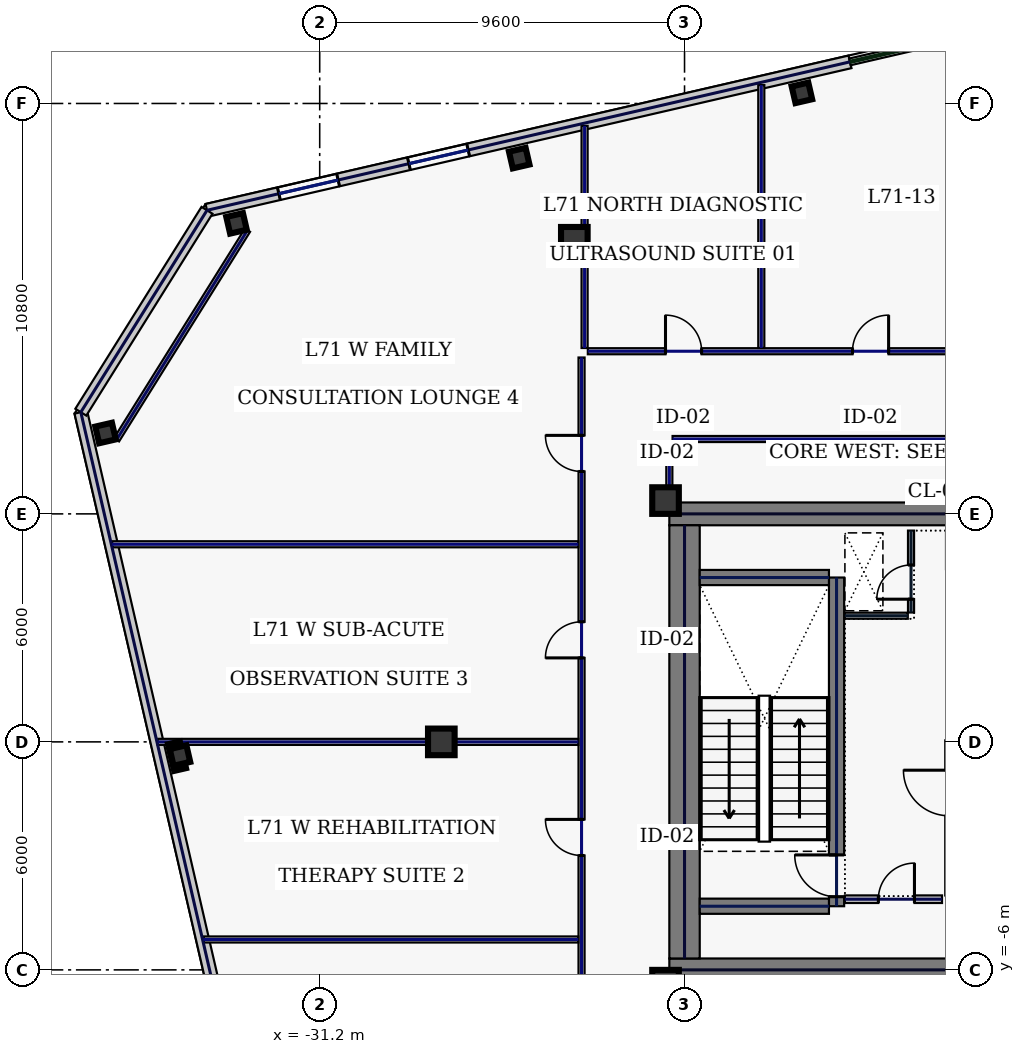
"""IFC4 building model, lengths in metres.
Left out: names, types, materials, properties, quantities, classifications, styles, units other than length and angle.
Written with IfcOpenShell. Run it as: python <this file> out.ifc"""

import sys

from ifc_helpers import new_model, si_unit, direction, frame, frame_2d, origin, origin_2d, place, context, subcontext, project, spatial, rectangle, hollow_rectangle, extrude, element, fill, save


model = new_model("IFC4")
c1 = context("Model", 3, precision=1e-05, world=origin(), true_north=direction((0.0, 1.0)))
c2 = subcontext(c1, "Body", "Model", "MODEL_VIEW")
j1 = project(units=[si_unit("LENGTHUNIT", "METRE"), si_unit("PLANEANGLEUNIT", "RADIAN")], contexts=[c1])
p1 = place(None, origin())
s1 = spatial("IfcSite", under=j1, at=p1, CompositionType="ELEMENT")
p2 = place(p1, origin())
s2 = spatial("IfcBuilding", under=s1, at=p2, CompositionType="ELEMENT")
p3 = place(p2, frame((0.0, 0.0, 305.0)))
s3 = spatial("IfcBuildingStorey", under=s2, at=p3, CompositionType="ELEMENT", Elevation=305.0)
for number, where, z_axis, x_axis in (
    (1, (-22.0, 6.0, 0.0), (0.0, 0.0, 1.0), (1.0, 0.0, 0.0)),
    (2, (-22.0, -6.0, 0.0), (0.0, 0.0, 1.0), (1.0, 0.0, 0.0)),
):
    element("IfcWall", number, at=place(p3, frame(where, z_axis=z_axis, x_axis=x_axis)), inside=s3, PredefinedType="SHEAR", context=c2, shape_type="SweptSolid", body=[
        extrude(rectangle(XDim=11.5, YDim=0.6, at=frame_2d((5.75, 0.0))), origin(), (0.0, 0.0, 1.0), 3.74),
    ])
p4 = place(p3, frame((-21.6, -5.7, 0.0), z_axis=(0.0, 0.0, 1.0), x_axis=(0.0, 1.0, 0.0)))
e3 = element("IfcWall", 3, at=p4, inside=s3, PredefinedType="SHEAR", context=c2, shape_type="SweptSolid", body=[
    extrude(rectangle(XDim=11.4, YDim=0.8, at=frame_2d((5.7, 0.0))), origin(), (0.0, 0.0, 1.0), 3.74),
])
p5 = place(p3, frame((-17.6, -4.325, 0.0), z_axis=(0.0, 0.0, 1.0), x_axis=(0.0, 1.0, 0.0)))
e4 = element("IfcWall", 4, at=p5, inside=s3, PredefinedType="SHEAR", context=c2, shape_type="SweptSolid", body=[
    extrude(rectangle(XDim=8.65, YDim=0.4, at=frame_2d((4.325, 0.0))), origin(), (0.0, 0.0, 1.0), 3.74),
])
p6 = place(p5, frame((0.25, 0.0, 0.0)))
e5 = element("IfcOpeningElement", 5, at=p6, cuts=e4, PredefinedType="OPENING", context=c2, shape_type="SweptSolid", body=[
    extrude(rectangle(XDim=1.1, YDim=2.2, at=frame_2d((0.55, 1.1))), frame((0.0, 0.21, 0.0), z_axis=(0.0, -1.0, 0.0), x_axis=(1.0, 0.0, 0.0)), (0.0, 0.0, 1.0), 0.42),
])
for number, where, z_axis, x_axis in (
    (6, (-21.2, -4.325, 0.0), (0.0, 0.0, 1.0), (1.0, 0.0, 0.0)),
    (7, (-21.2, 4.325, 0.0), (0.0, 0.0, 1.0), (1.0, 0.0, 0.0)),
):
    element("IfcWall", number, at=place(p3, frame(where, z_axis=z_axis, x_axis=x_axis)), inside=s3, PredefinedType="SHEAR", context=c2, shape_type="SweptSolid", body=[
        extrude(rectangle(XDim=3.4, YDim=0.4, at=frame_2d((1.7, 0.0))), origin(), (0.0, 0.0, 1.0), 3.74),
    ])
for number, where, z_axis, x_axis in (
    (8, (-22.1, -6.35, 0.0), (0.0, 0.0, 1.0), (1.0, 0.0, 0.0)),
    (9, (-22.1, 6.35, 0.0), (0.0, 0.0, 1.0), (1.0, 0.0, 0.0)),
    (10, (-24.5, 13.2, 0.0), (0.0, 0.0, 1.0), (1.0, 0.0, 0.0)),
    (11, (-28.0, 0.0, 0.0), (0.0, 0.0, 1.0), (1.0, 0.0, 0.0)),
):
    element("IfcColumn", number, at=place(p3, frame(where, z_axis=z_axis, x_axis=x_axis)), inside=s3, PredefinedType="COLUMN", context=c2, shape_type="SweptSolid", body=[
        extrude(hollow_rectangle(XDim=0.7, YDim=0.7, WallThickness=0.032, at=origin_2d()), origin(), (0.0, 0.0, 1.0), 3.74),
    ])
for number, where, z_axis, x_axis in (
    (12, (-18.511, 17.08, 0.0), (0.0, 0.0, 1.0), (0.974, 0.225, 0.0)),
    (13, (-25.95, 15.362, 0.0), (0.0, 0.0, 1.0), (0.974, 0.225, 0.0)),
    (14, (-33.389, 13.645, 0.0), (0.0, 0.0, 1.0), (0.974, 0.225, 0.0)),
    (15, (-36.836, 8.128, 0.0), (0.0, 0.0, 1.0), (0.974, 0.225, 0.0)),
    (16, (-34.877, -0.359, 0.0), (0.0, 0.0, 1.0), (0.974, 0.225, 0.0)),
):
    element("IfcColumn", number, at=place(p3, frame(where, z_axis=z_axis, x_axis=x_axis)), inside=s3, PredefinedType="COLUMN", context=c2, shape_type="SweptSolid", body=[
        extrude(hollow_rectangle(XDim=0.45, YDim=0.45, WallThickness=0.022, at=origin_2d()), origin(), (0.0, 0.0, 1.0), 3.74),
    ])
p7 = place(p3, frame((-17.245, 17.895, 0.0), z_axis=(0.0, 0.0, 1.0), x_axis=(-0.97437318493, -0.224937539085, 0.0)))
e17 = element("IfcWall", 17, at=p7, inside=s3, PredefinedType="STANDARD", context=c2, shape_type="SweptSolid", body=[
    extrude(rectangle(XDim=17.366, YDim=0.34, at=frame_2d((8.683, 0.0))), origin(), (0.0, 0.0, 1.0), 3.74),
])
p8 = place(p7, frame((13.825, 0.0, 0.22)))
e18 = element("IfcOpeningElement", 18, at=p8, cuts=e17, PredefinedType="OPENING", context=c2, shape_type="SweptSolid", body=[
    extrude(rectangle(XDim=1.6, YDim=1.2, at=frame_2d((0.8, 0.6))), frame((0.0, 0.18, 0.0), z_axis=(0.0, -1.0, 0.0), x_axis=(1.0, 0.0, 0.0)), (0.0, 0.0, 1.0), 0.36),
])
p9 = place(p7, frame((10.313, 0.0, 0.22)))
e19 = element("IfcOpeningElement", 19, at=p9, cuts=e17, PredefinedType="OPENING", context=c2, shape_type="SweptSolid", body=[
    extrude(rectangle(XDim=1.6, YDim=1.2, at=frame_2d((0.8, 0.6))), frame((0.0, 0.18, 0.0), z_axis=(0.0, -1.0, 0.0), x_axis=(1.0, 0.0, 0.0)), (0.0, 0.0, 1.0), 0.36),
])
p10 = place(p3, frame((-37.486, 8.676, 0.0), z_axis=(0.0, 0.0, 1.0), x_axis=(0.224953091034, -0.974369594576, 0.0)))
e20 = element("IfcWall", 20, at=p10, inside=s3, PredefinedType="STANDARD", context=c2, shape_type="SweptSolid", body=[
    extrude(rectangle(XDim=36.2, YDim=0.34, at=frame_2d((18.1, 0.0))), origin(), (0.0, 0.0, 1.0), 3.74),
])
p11 = place(p10, frame((21.825, 0.0, 0.22)))
e21 = element("IfcOpeningElement", 21, at=p11, cuts=e20, PredefinedType="OPENING", context=c2, shape_type="SweptSolid", body=[
    extrude(rectangle(XDim=1.6, YDim=1.2, at=frame_2d((0.8, 0.6))), frame((0.0, 0.18, 0.0), z_axis=(0.0, -1.0, 0.0), x_axis=(1.0, 0.0, 0.0)), (0.0, 0.0, 1.0), 0.36),
])
p12 = place(p10, frame((30.875, 0.0, 0.22)))
e22 = element("IfcOpeningElement", 22, at=p12, cuts=e20, PredefinedType="OPENING", context=c2, shape_type="SweptSolid", body=[
    extrude(rectangle(XDim=1.6, YDim=1.2, at=frame_2d((0.8, 0.6))), frame((0.0, 0.18, 0.0), z_axis=(0.0, -1.0, 0.0), x_axis=(1.0, 0.0, 0.0)), (0.0, 0.0, 1.0), 0.36),
])
p13 = place(p3, frame((-34.166, 13.989, 0.0), z_axis=(0.0, 0.0, 1.0), x_axis=(-0.529935887993, -0.848037708252, 0.0)))
e23 = element("IfcWall", 23, at=p13, inside=s3, PredefinedType="STANDARD", context=c2, shape_type="SweptSolid", body=[
    extrude(rectangle(XDim=6.265, YDim=0.34, at=frame_2d((3.133, 0.0))), origin(), (0.0, 0.0, 1.0), 3.74),
])
p14 = place(p3, frame((-15.64, 3.405, 0.0), z_axis=(0.0, 0.0, 1.0), x_axis=(0.0, 1.0, 0.0)))
e24 = element("IfcWall", 24, at=p14, inside=s3, PredefinedType="PARTITIONING", context=c2, shape_type="SweptSolid", body=[
    extrude(rectangle(XDim=2.155, YDim=0.16, at=frame_2d((1.078, 0.0))), origin(), (0.0, 0.0, 1.0), 3.74),
])
p15 = place(p14, frame((0.35, 0.0, 0.0)))
e25 = element("IfcOpeningElement", 25, at=p15, cuts=e24, PredefinedType="OPENING", context=c2, shape_type="SweptSolid", body=[
    extrude(rectangle(XDim=0.9, YDim=2.2, at=frame_2d((0.45, 1.1))), frame((0.0, 0.09, 0.0), z_axis=(0.0, -1.0, 0.0), x_axis=(1.0, 0.0, 0.0)), (0.0, 0.0, 1.0), 0.18),
])
p16 = place(p3, frame((-17.38, 3.32, 0.0), z_axis=(0.0, 0.0, 1.0), x_axis=(1.0, 0.0, 0.0)))
e26 = element("IfcWall", 26, at=p16, inside=s3, PredefinedType="PARTITIONING", context=c2, shape_type="SweptSolid", body=[
    extrude(rectangle(XDim=1.655, YDim=0.16, at=frame_2d((0.827, 0.0))), origin(), (0.0, 0.0, 1.0), 3.74),
])
p17 = place(p3, frame((-17.38, -4.14, 0.0), z_axis=(0.0, 0.0, 1.0), x_axis=(1.0, 0.0, 0.0)))
e27 = element("IfcWall", 27, at=p17, inside=s3, PredefinedType="SOLIDWALL", context=c2, shape_type="SweptSolid", body=[
    extrude(rectangle(XDim=2.555, YDim=0.2, at=frame_2d((1.277, 0.0))), origin(), (0.0, 0.0, 1.0), 3.74),
])
p18 = place(p17, frame((0.88, 0.0, 0.0)))
e28 = element("IfcOpeningElement", 28, at=p18, cuts=e27, PredefinedType="OPENING", context=c2, shape_type="SweptSolid", body=[
    extrude(rectangle(XDim=0.95, YDim=2.2, at=frame_2d((0.475, 1.1))), frame((0.0, 0.11, 0.0), z_axis=(0.0, -1.0, 0.0), x_axis=(1.0, 0.0, 0.0)), (0.0, 0.0, 1.0), 0.22),
])
p19 = place(p3, frame((-14.64, -4.035, 0.0), z_axis=(0.0, 0.0, 1.0), x_axis=(0.0, 1.0, 0.0)))
e29 = element("IfcWall", 29, at=p19, inside=s3, PredefinedType="SOLIDWALL", context=c2, shape_type="SweptSolid", body=[
    extrude(rectangle(XDim=4.075, YDim=0.2, at=frame_2d((2.038, 0.0))), origin(), (0.0, 0.0, 1.0), 3.74),
])
p20 = place(p19, frame((2.09, 0.0, 0.0)))
e30 = element("IfcOpeningElement", 30, at=p20, cuts=e29, PredefinedType="OPENING", context=c2, shape_type="SweptSolid", body=[
    extrude(rectangle(XDim=1.2, YDim=2.2, at=frame_2d((0.6, 1.1))), frame((0.0, 0.11, 0.0), z_axis=(0.0, -1.0, 0.0), x_axis=(1.0, 0.0, 0.0)), (0.0, 0.0, 1.0), 0.22),
])
p21 = place(p3, frame((-33.1, 13.465, 0.0), z_axis=(0.0, 0.0, 1.0), x_axis=(-0.529958457806, -0.848023604035, 0.0)))
e31 = element("IfcWall", 31, at=p21, inside=s3, PredefinedType="PARTITIONING", context=c2, shape_type="SweptSolid", body=[
    extrude(rectangle(XDim=6.505, YDim=0.16, at=frame_2d((3.252, 0.0))), origin(), (0.0, 0.0, 1.0), 1.535),
])
p22 = place(p3, frame((-24.31, -10.015, 0.0), z_axis=(0.0, 0.0, 1.0), x_axis=(0.0, 1.0, 0.0)))
e32 = element("IfcWall", 32, at=p22, inside=s3, PredefinedType="PARTITIONING", context=c2, shape_type="SweptSolid", body=[
    extrude(rectangle(XDim=20.13, YDim=0.16, at=frame_2d((10.065, 0.0))), origin(), (0.0, 0.0, 1.0), 3.74),
])
p23 = place(p22, frame((2.169, 0.0, 0.0)))
e33 = element("IfcOpeningElement", 33, at=p23, cuts=e32, PredefinedType="OPENING", context=c2, shape_type="SweptSolid", body=[
    extrude(rectangle(XDim=0.95, YDim=2.2, at=frame_2d((0.475, 1.1))), frame((0.0, 0.09, 0.0), z_axis=(0.0, -1.0, 0.0), x_axis=(1.0, 0.0, 0.0)), (0.0, 0.0, 1.0), 0.18),
])
p24 = place(p22, frame((7.025, 0.0, 0.0)))
e34 = element("IfcOpeningElement", 34, at=p24, cuts=e32, PredefinedType="OPENING", context=c2, shape_type="SweptSolid", body=[
    extrude(rectangle(XDim=0.95, YDim=2.2, at=frame_2d((0.475, 1.1))), frame((0.0, 0.09, 0.0), z_axis=(0.0, -1.0, 0.0), x_axis=(1.0, 0.0, 0.0)), (0.0, 0.0, 1.0), 0.18),
])
p25 = place(p22, frame((12.225, 0.0, 0.0)))
e35 = element("IfcOpeningElement", 35, at=p25, cuts=e32, PredefinedType="OPENING", context=c2, shape_type="SweptSolid", body=[
    extrude(rectangle(XDim=0.95, YDim=2.2, at=frame_2d((0.475, 1.1))), frame((0.0, 0.09, 0.0), z_axis=(0.0, -1.0, 0.0), x_axis=(1.0, 0.0, 0.0)), (0.0, 0.0, 1.0), 0.18),
])
p26 = place(p22, frame((17.131, 0.0, 0.0)))
e36 = element("IfcOpeningElement", 36, at=p26, cuts=e32, PredefinedType="OPENING", context=c2, shape_type="SweptSolid", body=[
    extrude(rectangle(XDim=0.95, YDim=2.2, at=frame_2d((0.475, 1.1))), frame((0.0, 0.09, 0.0), z_axis=(0.0, -1.0, 0.0), x_axis=(1.0, 0.0, 0.0)), (0.0, 0.0, 1.0), 0.18),
])
p27 = place(p3, frame((-24.145, 10.28, 0.0), z_axis=(0.0, 0.0, 1.0), x_axis=(1.0, 0.0, 0.0)))
e37 = element("IfcWall", 37, at=p27, inside=s3, PredefinedType="PARTITIONING", context=c2, shape_type="SweptSolid", body=[
    extrude(rectangle(XDim=48.29, YDim=0.16, at=frame_2d((24.145, 0.0))), origin(), (0.0, 0.0, 1.0), 3.74),
])
p28 = place(p27, frame((2.044, 0.0, 0.0)))
e38 = element("IfcOpeningElement", 38, at=p28, cuts=e37, PredefinedType="OPENING", context=c2, shape_type="SweptSolid", body=[
    extrude(rectangle(XDim=0.95, YDim=2.2, at=frame_2d((0.475, 1.1))), frame((0.0, 0.09, 0.0), z_axis=(0.0, -1.0, 0.0), x_axis=(1.0, 0.0, 0.0)), (0.0, 0.0, 1.0), 0.18),
])
p29 = place(p27, frame((6.965, 0.0, 0.0)))
e39 = element("IfcOpeningElement", 39, at=p29, cuts=e37, PredefinedType="OPENING", context=c2, shape_type="SweptSolid", body=[
    extrude(rectangle(XDim=0.95, YDim=2.2, at=frame_2d((0.475, 1.1))), frame((0.0, 0.09, 0.0), z_axis=(0.0, -1.0, 0.0), x_axis=(1.0, 0.0, 0.0)), (0.0, 0.0, 1.0), 0.18),
])
p30 = place(p27, frame((13.58, 0.0, 0.0)))
e40 = element("IfcOpeningElement", 40, at=p30, cuts=e37, PredefinedType="OPENING", context=c2, shape_type="SweptSolid", body=[
    extrude(rectangle(XDim=1.45, YDim=2.2, at=frame_2d((0.725, 1.1))), frame((0.0, 0.09, 0.0), z_axis=(0.0, -1.0, 0.0), x_axis=(1.0, 0.0, 0.0)), (0.0, 0.0, 1.0), 0.18),
])
p31 = place(p27, frame((22.205, 0.0, 0.0)))
e41 = element("IfcOpeningElement", 41, at=p31, cuts=e37, PredefinedType="OPENING", context=c2, shape_type="SweptSolid", body=[
    extrude(rectangle(XDim=1.05, YDim=2.2, at=frame_2d((0.525, 1.1))), frame((0.0, 0.09, 0.0), z_axis=(0.0, -1.0, 0.0), x_axis=(1.0, 0.0, 0.0)), (0.0, 0.0, 1.0), 0.18),
])
p32 = place(p27, frame((31.105, 0.0, 0.0)))
e42 = element("IfcOpeningElement", 42, at=p32, cuts=e37, PredefinedType="OPENING", context=c2, shape_type="SweptSolid", body=[
    extrude(rectangle(XDim=0.95, YDim=2.2, at=frame_2d((0.475, 1.1))), frame((0.0, 0.09, 0.0), z_axis=(0.0, -1.0, 0.0), x_axis=(1.0, 0.0, 0.0)), (0.0, 0.0, 1.0), 0.18),
])
p33 = place(p27, frame((39.27, 0.0, 0.0)))
e43 = element("IfcOpeningElement", 43, at=p33, cuts=e37, PredefinedType="OPENING", context=c2, shape_type="SweptSolid", body=[
    extrude(rectangle(XDim=1.3, YDim=2.2, at=frame_2d((0.65, 1.1))), frame((0.0, 0.09, 0.0), z_axis=(0.0, -1.0, 0.0), x_axis=(1.0, 0.0, 0.0)), (0.0, 0.0, 1.0), 0.18),
])
p34 = place(p27, frame((45.291, 0.0, 0.0)))
e44 = element("IfcOpeningElement", 44, at=p34, cuts=e37, PredefinedType="OPENING", context=c2, shape_type="SweptSolid", body=[
    extrude(rectangle(XDim=1.3, YDim=2.2, at=frame_2d((0.65, 1.1))), frame((0.0, 0.09, 0.0), z_axis=(0.0, -1.0, 0.0), x_axis=(1.0, 0.0, 0.0)), (0.0, 0.0, 1.0), 0.18),
])
p35 = place(p3, frame((-10.715, 7.97, 0.0), z_axis=(0.0, 0.0, 1.0), x_axis=(-1.0, 0.0, 0.0)))
e45 = element("IfcWall", 45, at=p35, inside=s3, PredefinedType="PARTITIONING", context=c2, shape_type="SweptSolid", body=[
    extrude(rectangle(XDim=11.2, YDim=0.16, at=frame_2d((5.6, 0.0))), origin(), (0.0, 0.0, 1.0), 3.74),
])
p36 = place(p3, frame((-22.0, 7.885, 0.0), z_axis=(0.0, 0.0, 1.0), x_axis=(0.0, -1.0, 0.0)))
e46 = element("IfcWall", 46, at=p36, inside=s3, PredefinedType="PARTITIONING", context=c2, shape_type="SweptSolid", body=[
    extrude(rectangle(XDim=1.465, YDim=0.16, at=frame_2d((0.732, 0.0))), origin(), (0.0, 0.0, 1.0), 3.74),
])
p37 = place(p3, frame((-24.23, 10.365, 0.0), z_axis=(0.0, 0.0, 1.0), x_axis=(0.0, 1.0, 0.0)))
e47 = element("IfcWall", 47, at=p37, inside=s3, PredefinedType="PARTITIONING", context=c2, shape_type="SweptSolid", body=[
    extrude(rectangle(XDim=5.846, YDim=0.16, at=frame_2d((2.923, 0.0))), origin(), (0.0, 0.0, 1.0), 3.74),
])
p38 = place(p3, frame((-19.58, 10.365, 0.0), z_axis=(0.0, 0.0, 1.0), x_axis=(0.0, 1.0, 0.0)))
e48 = element("IfcWall", 48, at=p38, inside=s3, PredefinedType="PARTITIONING", context=c2, shape_type="SweptSolid", body=[
    extrude(rectangle(XDim=6.919, YDim=0.16, at=frame_2d((3.46, 0.0))), origin(), (0.0, 0.0, 1.0), 3.74),
])
p39 = place(p3, frame((-34.262, -5.2, 0.0), z_axis=(0.0, 0.0, 1.0), x_axis=(1.0, 0.0, 0.0)))
e49 = element("IfcWall", 49, at=p39, inside=s3, PredefinedType="PARTITIONING", context=c2, shape_type="SweptSolid", body=[
    extrude(rectangle(XDim=9.867, YDim=0.16, at=frame_2d((4.933, 0.0))), origin(), (0.0, 0.0, 1.0), 3.74),
])
p40 = place(p3, frame((-35.462, 0.0, 0.0), z_axis=(0.0, 0.0, 1.0), x_axis=(1.0, 0.0, 0.0)))
e50 = element("IfcWall", 50, at=p40, inside=s3, PredefinedType="PARTITIONING", context=c2, shape_type="SweptSolid", body=[
    extrude(rectangle(XDim=11.067, YDim=0.16, at=frame_2d((5.534, 0.0))), origin(), (0.0, 0.0, 1.0), 3.335),
])
p41 = place(p3, frame((-36.663, 5.2, 0.0), z_axis=(0.0, 0.0, 1.0), x_axis=(1.0, 0.0, 0.0)))
e51 = element("IfcWall", 51, at=p41, inside=s3, PredefinedType="PARTITIONING", context=c2, shape_type="SweptSolid", body=[
    extrude(rectangle(XDim=12.268, YDim=0.16, at=frame_2d((6.134, 0.0))), origin(), (0.0, 0.0, 1.0), 3.74),
])
p42 = place(p8, origin())
e52 = element("IfcWindow", 52, at=p42, inside=s3, PartitioningType="SINGLE_PANEL", PredefinedType="WINDOW", context=c2, shape_type="SweptSolid", body=[
    extrude(rectangle(XDim=1.6, YDim=1.2, at=frame_2d((0.8, 0.6))), frame((0.0, 0.03, 0.0), z_axis=(0.0, -1.0, 0.0), x_axis=(1.0, 0.0, 0.0)), (0.0, 0.0, 1.0), 0.06),
])
fill(e18, e52)
p43 = place(p9, origin())
e53 = element("IfcWindow", 53, at=p43, inside=s3, PartitioningType="SINGLE_PANEL", PredefinedType="WINDOW", context=c2, shape_type="SweptSolid", body=[
    extrude(rectangle(XDim=1.6, YDim=1.2, at=frame_2d((0.8, 0.6))), frame((0.0, 0.03, 0.0), z_axis=(0.0, -1.0, 0.0), x_axis=(1.0, 0.0, 0.0)), (0.0, 0.0, 1.0), 0.06),
])
fill(e19, e53)
p44 = place(p6, origin())
e54 = element("IfcDoor", 54, at=p44, inside=s3, OperationType="SINGLE_SWING_RIGHT", PredefinedType="DOOR", context=c2, shape_type="SweptSolid", body=[
    extrude(rectangle(XDim=1.1, YDim=2.2, at=frame_2d((0.55, 1.1))), frame((0.0, 0.025, 0.0), z_axis=(0.0, -1.0, 0.0), x_axis=(1.0, 0.0, 0.0)), (0.0, 0.0, 1.0), 0.05),
])
fill(e5, e54)
p45 = place(p15, origin())
e55 = element("IfcDoor", 55, at=p45, inside=s3, OperationType="SINGLE_SWING_LEFT", PredefinedType="DOOR", context=c2, shape_type="SweptSolid", body=[
    extrude(rectangle(XDim=0.9, YDim=2.2, at=frame_2d((0.45, 1.1))), frame((0.0, 0.025, 0.0), z_axis=(0.0, -1.0, 0.0), x_axis=(1.0, 0.0, 0.0)), (0.0, 0.0, 1.0), 0.05),
])
fill(e25, e55)
p46 = place(p18, origin())
e56 = element("IfcDoor", 56, at=p46, inside=s3, OperationType="SINGLE_SWING_RIGHT", PredefinedType="DOOR", context=c2, shape_type="SweptSolid", body=[
    extrude(rectangle(XDim=0.95, YDim=2.2, at=frame_2d((0.475, 1.1))), frame((0.0, 0.025, 0.0), z_axis=(0.0, -1.0, 0.0), x_axis=(1.0, 0.0, 0.0)), (0.0, 0.0, 1.0), 0.05),
])
fill(e28, e56)
p47 = place(p28, origin())
e57 = element("IfcDoor", 57, at=p47, inside=s3, OperationType="SINGLE_SWING_LEFT", PredefinedType="DOOR", context=c2, shape_type="SweptSolid", body=[
    extrude(rectangle(XDim=0.95, YDim=2.2, at=frame_2d((0.475, 1.1))), frame((0.0, 0.025, 0.0), z_axis=(0.0, -1.0, 0.0), x_axis=(1.0, 0.0, 0.0)), (0.0, 0.0, 1.0), 0.05),
])
fill(e38, e57)
p48 = place(p29, origin())
e58 = element("IfcDoor", 58, at=p48, inside=s3, OperationType="SINGLE_SWING_RIGHT", PredefinedType="DOOR", context=c2, shape_type="SweptSolid", body=[
    extrude(rectangle(XDim=0.95, YDim=2.2, at=frame_2d((0.475, 1.1))), frame((0.0, 0.025, 0.0), z_axis=(0.0, -1.0, 0.0), x_axis=(1.0, 0.0, 0.0)), (0.0, 0.0, 1.0), 0.05),
])
fill(e39, e58)
p49 = place(p24, origin())
e59 = element("IfcDoor", 59, at=p49, inside=s3, OperationType="SINGLE_SWING_RIGHT", PredefinedType="DOOR", context=c2, shape_type="SweptSolid", body=[
    extrude(rectangle(XDim=0.95, YDim=2.2, at=frame_2d((0.475, 1.1))), frame((0.0, 0.025, 0.0), z_axis=(0.0, -1.0, 0.0), x_axis=(1.0, 0.0, 0.0)), (0.0, 0.0, 1.0), 0.05),
])
fill(e34, e59)
p50 = place(p25, origin())
e60 = element("IfcDoor", 60, at=p50, inside=s3, OperationType="SINGLE_SWING_LEFT", PredefinedType="DOOR", context=c2, shape_type="SweptSolid", body=[
    extrude(rectangle(XDim=0.95, YDim=2.2, at=frame_2d((0.475, 1.1))), frame((0.0, 0.025, 0.0), z_axis=(0.0, -1.0, 0.0), x_axis=(1.0, 0.0, 0.0)), (0.0, 0.0, 1.0), 0.05),
])
fill(e35, e60)
p51 = place(p26, origin())
e61 = element("IfcDoor", 61, at=p51, inside=s3, OperationType="SINGLE_SWING_RIGHT", PredefinedType="DOOR", context=c2, shape_type="SweptSolid", body=[
    extrude(rectangle(XDim=0.95, YDim=2.2, at=frame_2d((0.475, 1.1))), frame((0.0, 0.025, 0.0), z_axis=(0.0, -1.0, 0.0), x_axis=(1.0, 0.0, 0.0)), (0.0, 0.0, 1.0), 0.05),
])
fill(e36, e61)
save(model, sys.argv[1])
